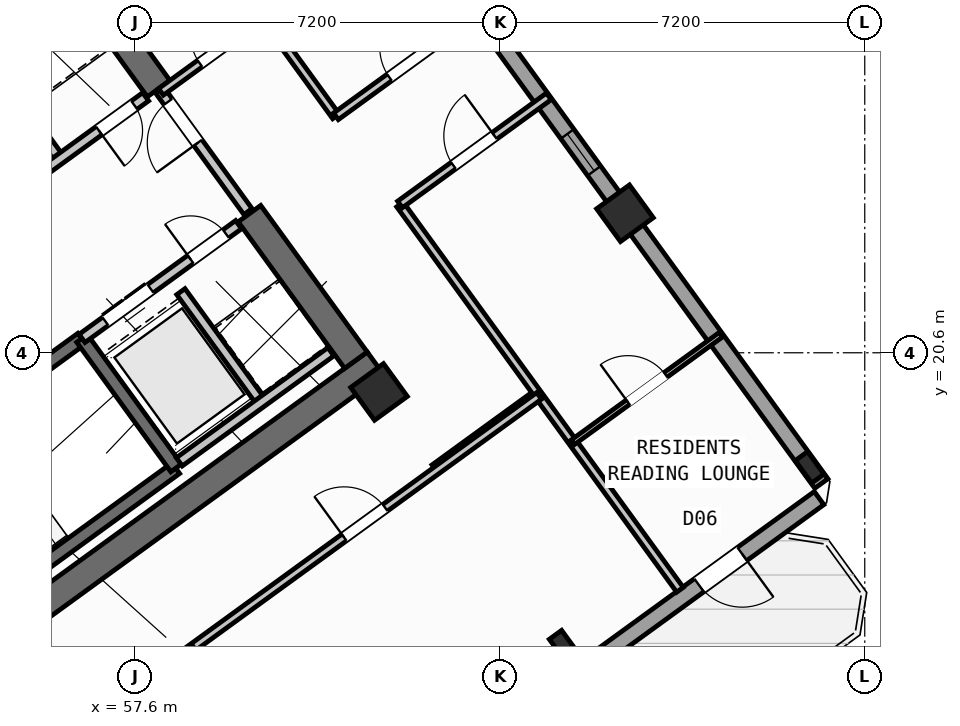
"""IFC4 building model, lengths in metres.
Left out: names, types, materials, properties, quantities, classifications, styles, units other than length and angle.
Written with IfcOpenShell. Run it as: python <this file> out.ifc"""

import sys

from ifc_helpers import new_model, si_unit, direction, frame, frame_2d, origin, origin_2d, place, context, subcontext, project, spatial, rectangle, hollow_rectangle, i_section, extrude, source, transform, mapped, element, fill, save


model = new_model("IFC4")
c1 = context("Model", 3, precision=1e-05, world=origin(), true_north=direction((0.0, 1.0)))
c2 = subcontext(c1, "Body", "Model", "MODEL_VIEW")
j1 = project(units=[si_unit("LENGTHUNIT", "METRE"), si_unit("PLANEANGLEUNIT", "RADIAN")], contexts=[c1])
p1 = place(None, origin())
s1 = spatial("IfcSite", under=j1, at=p1, CompositionType="ELEMENT")
p2 = place(p1, origin())
s2 = spatial("IfcBuilding", under=s1, at=p2, CompositionType="ELEMENT")
p3 = place(p2, frame((0.0, 0.0, 174.9)))
s3 = spatial("IfcBuildingStorey", under=s2, at=p3, CompositionType="ELEMENT", Elevation=174.9)
p4 = place(p3, frame((52.359, 13.14, 0.0), z_axis=(0.0, 0.0, 1.0), x_axis=(0.809014896919, 0.587788139183, 0.0)))
e1 = element("IfcWall", 1, at=p4, inside=s3, PredefinedType="SHEAR", context=c2, shape_type="SweptSolid", body=[
    extrude(rectangle(XDim=12.34, YDim=0.55, at=frame_2d((6.17, 0.0))), origin(), (0.0, 0.0, 1.0), 4.22),
])
p5 = place(p3, frame((61.958, 20.454, 0.0), z_axis=(0.0, 0.0, 1.0), x_axis=(-0.587802113096, 0.809004744015, 0.0)))
e2 = element("IfcWall", 2, at=p5, inside=s3, PredefinedType="SHEAR", context=c2, shape_type="SweptSolid", body=[
    extrude(rectangle(XDim=3.575, YDim=0.55, at=frame_2d((1.788, 0.0))), origin(), (0.0, 0.0, 1.0), 4.22),
])
p6 = place(p3, frame((58.064, 25.813, 0.0), z_axis=(0.0, 0.0, 1.0), x_axis=(-0.587764933797, 0.809031756236, 0.0)))
e3 = element("IfcWall", 3, at=p6, inside=s3, PredefinedType="SHEAR", context=c2, shape_type="SweptSolid", body=[
    extrude(rectangle(XDim=6.425, YDim=0.55, at=frame_2d((3.212, 0.0))), origin(), (0.0, 0.0, 1.0), 4.22),
])
m1 = source(origin(), c2, "Body", "SweptSolid", [
    extrude(i_section(OverallWidth=0.3, OverallDepth=0.55, WebThickness=0.015, FlangeThickness=0.029, at=origin_2d()), origin(), (0.0, 0.0, 1.0), 4.5),
])
p7 = place(p3, frame((66.058, 14.811, 0.0), z_axis=(0.0, 0.0, 1.0), x_axis=(0.809016994375, 0.587785252292, 0.0)))
e4 = element("IfcColumn", 4, at=p7, inside=s3, PredefinedType="COLUMN", context=c2, shape_type="MappedRepresentation", body=[
    mapped(m1, transform((0.0, 0.0, 0.0), scale=1.0)),
])
m2 = source(origin(), c2, "Body", "SweptSolid", [
    extrude(hollow_rectangle(XDim=0.8, YDim=0.8, WallThickness=0.032, at=origin_2d()), origin(), (0.0, 0.0, 1.0), 4.5),
])
p8 = place(p3, frame((62.414, 19.827, 0.0), z_axis=(0.0, 0.0, 1.0), x_axis=(0.809016994375, 0.587785252292, 0.0)))
e5 = element("IfcColumn", 5, at=p8, inside=s3, PredefinedType="COLUMN", context=c2, shape_type="MappedRepresentation", body=[
    mapped(m2, transform((0.0, 0.0, 0.0), scale=1.0)),
])
p9 = place(p3, frame((70.912, 18.338, 0.0), z_axis=(0.0, 0.0, 1.0), x_axis=(0.809016994375, 0.587785252292, 0.0)))
e6 = element("IfcColumn", 6, at=p9, inside=s3, PredefinedType="COLUMN", context=c2, shape_type="MappedRepresentation", body=[
    mapped(m1, transform((0.0, 0.0, 0.0), scale=1.0)),
])
p10 = place(p3, frame((67.268, 23.354, 0.0), z_axis=(0.0, 0.0, 1.0), x_axis=(0.809016994375, 0.587785252292, 0.0)))
e7 = element("IfcColumn", 7, at=p10, inside=s3, PredefinedType="COLUMN", context=c2, shape_type="MappedRepresentation", body=[
    mapped(m2, transform((0.0, 0.0, 0.0), scale=1.0)),
])
p11 = place(p3, frame((43.938, 25.192, 0.0), z_axis=(0.0, 0.0, 1.0), x_axis=(0.809016324578, 0.587786174187, 0.0)))
e8 = element("IfcWall", 8, at=p11, inside=s3, PredefinedType="STANDARD", context=c2, shape_type="SweptSolid", body=[
    extrude(rectangle(XDim=17.587, YDim=0.32, at=frame_2d((8.794, 0.0))), origin(), (0.0, 0.0, 1.0), 4.22),
])
p12 = place(p11, frame((14.926, 0.0, 0.0)))
e9 = element("IfcOpeningElement", 9, at=p12, cuts=e8, PredefinedType="OPENING", context=c2, shape_type="SweptSolid", body=[
    extrude(rectangle(XDim=1.05, YDim=2.15, at=frame_2d((0.525, 1.075))), frame((0.0, 0.17, 0.0), z_axis=(0.0, -1.0, 0.0), x_axis=(1.0, 0.0, 0.0)), (0.0, 0.0, 1.0), 0.34),
])
p13 = place(p11, frame((2.606, 0.0, 0.8)))
e10 = element("IfcOpeningElement", 10, at=p13, cuts=e8, PredefinedType="OPENING", context=c2, shape_type="SweptSolid", body=[
    extrude(rectangle(XDim=2.1, YDim=1.55, at=frame_2d((1.05, 0.775))), frame((0.0, 0.17, 0.0), z_axis=(0.0, -1.0, 0.0), x_axis=(1.0, 0.0, 0.0)), (0.0, 0.0, 1.0), 0.34),
])
p14 = place(p11, frame((6.881, 0.0, 0.8)))
e11 = element("IfcOpeningElement", 11, at=p14, cuts=e8, PredefinedType="OPENING", context=c2, shape_type="SweptSolid", body=[
    extrude(rectangle(XDim=2.1, YDim=1.55, at=frame_2d((1.05, 0.775))), frame((0.0, 0.17, 0.0), z_axis=(0.0, -1.0, 0.0), x_axis=(1.0, 0.0, 0.0)), (0.0, 0.0, 1.0), 0.34),
])
p15 = place(p3, frame((58.455, 35.484, 0.0), z_axis=(0.0, 0.0, 1.0), x_axis=(0.587783625747, -0.809018176127, 0.0)))
e12 = element("IfcWall", 12, at=p15, inside=s3, PredefinedType="STANDARD", context=c2, shape_type="SweptSolid", body=[
    extrude(rectangle(XDim=21.587, YDim=0.32, at=frame_2d((10.794, 0.0))), origin(), (0.0, 0.0, 1.0), 2.395),
])
p16 = place(p15, frame((1.807, 0.0, 1.0)))
e13 = element("IfcOpeningElement", 13, at=p16, cuts=e12, PredefinedType="OPENING", context=c2, shape_type="SweptSolid", body=[
    extrude(rectangle(XDim=0.9, YDim=1.25, at=frame_2d((0.45, 0.625))), frame((0.0, 0.17, 0.0), z_axis=(0.0, -1.0, 0.0), x_axis=(1.0, 0.0, 0.0)), (0.0, 0.0, 1.0), 0.34),
])
p17 = place(p15, frame((5.195, 0.0, 1.0)))
e14 = element("IfcOpeningElement", 14, at=p17, cuts=e12, PredefinedType="OPENING", context=c2, shape_type="SweptSolid", body=[
    extrude(rectangle(XDim=0.9, YDim=1.25, at=frame_2d((0.45, 0.625))), frame((0.0, 0.17, 0.0), z_axis=(0.0, -1.0, 0.0), x_axis=(1.0, 0.0, 0.0)), (0.0, 0.0, 1.0), 0.34),
])
p18 = place(p15, frame((13.059, 0.0, 1.0)))
e15 = element("IfcOpeningElement", 15, at=p18, cuts=e12, PredefinedType="OPENING", context=c2, shape_type="SweptSolid", body=[
    extrude(rectangle(XDim=0.9, YDim=1.25, at=frame_2d((0.45, 0.625))), frame((0.0, 0.17, 0.0), z_axis=(0.0, -1.0, 0.0), x_axis=(1.0, 0.0, 0.0)), (0.0, 0.0, 1.0), 0.34),
])
p19 = place(p3, frame((71.098, 17.731, 0.0), z_axis=(0.0, 0.0, 1.0), x_axis=(-0.809021120468, -0.587779573171, 0.0)))
e16 = element("IfcWall", 16, at=p19, inside=s3, PredefinedType="STANDARD", context=c2, shape_type="SweptSolid", body=[
    extrude(rectangle(XDim=17.588, YDim=0.32, at=frame_2d((8.794, 0.0))), origin(), (0.0, 0.0, 1.0), 4.22),
])
p20 = place(p19, frame((1.875, 0.0, 0.0)))
e17 = element("IfcOpeningElement", 17, at=p20, cuts=e16, PredefinedType="OPENING", context=c2, shape_type="SweptSolid", body=[
    extrude(rectangle(XDim=1.05, YDim=2.15, at=frame_2d((0.525, 1.075))), frame((0.0, 0.17, 0.0), z_axis=(0.0, -1.0, 0.0), x_axis=(1.0, 0.0, 0.0)), (0.0, 0.0, 1.0), 0.34),
])
p21 = place(p19, frame((7.801, 0.0, 0.8)))
e18 = element("IfcOpeningElement", 18, at=p21, cuts=e16, PredefinedType="OPENING", context=c2, shape_type="SweptSolid", body=[
    extrude(rectangle(XDim=2.1, YDim=1.55, at=frame_2d((1.05, 0.775))), frame((0.0, 0.17, 0.0), z_axis=(0.0, -1.0, 0.0), x_axis=(1.0, 0.0, 0.0)), (0.0, 0.0, 1.0), 0.34),
])
p22 = place(p19, frame((13.379, 0.0, 0.85)))
e19 = element("IfcOpeningElement", 19, at=p22, cuts=e16, PredefinedType="OPENING", context=c2, shape_type="SweptSolid", body=[
    extrude(rectangle(XDim=1.8, YDim=1.5, at=frame_2d((0.9, 0.75))), frame((0.0, 0.17, 0.0), z_axis=(0.0, -1.0, 0.0), x_axis=(1.0, 0.0, 0.0)), (0.0, 0.0, 1.0), 0.34),
])
p23 = place(p3, frame((49.863, 23.44, 0.0), z_axis=(0.0, 0.0, 1.0), x_axis=(0.809003474932, 0.587803859759, 0.0)))
e20 = element("IfcWall", 20, at=p23, inside=s3, PredefinedType="SHEAR", context=c2, shape_type="SweptSolid", body=[
    extrude(rectangle(XDim=7.46, YDim=0.26, at=frame_2d((3.73, 0.0))), origin(), (0.0, 0.0, 1.0), 4.22),
])
p24 = place(p23, frame((0.36, 0.0, 0.0)))
e21 = element("IfcOpeningElement", 21, at=p24, cuts=e20, PredefinedType="OPENING", context=c2, shape_type="SweptSolid", body=[
    extrude(rectangle(XDim=0.86, YDim=2.05, at=frame_2d((0.43, 1.025))), frame((0.0, 0.14, 0.0), z_axis=(0.0, -1.0, 0.0), x_axis=(1.0, 0.0, 0.0)), (0.0, 0.0, 1.0), 0.28),
])
p25 = place(p3, frame((52.472, 14.013, 0.0), z_axis=(0.0, 0.0, 1.0), x_axis=(0.809028366311, 0.587769599847, 0.0)))
e22 = element("IfcWall", 22, at=p25, inside=s3, PredefinedType="SHEAR", context=c2, shape_type="SweptSolid", body=[
    extrude(rectangle(XDim=7.33, YDim=0.26, at=frame_2d((3.665, 0.0))), origin(), (0.0, 0.0, 1.0), 4.22),
])
p26 = place(p3, frame((50.615, 16.57, 0.0), z_axis=(0.0, 0.0, 1.0), x_axis=(0.809028366311, 0.587769599847, 0.0)))
e23 = element("IfcWall", 23, at=p26, inside=s3, PredefinedType="SHEAR", context=c2, shape_type="SweptSolid", body=[
    extrude(rectangle(XDim=7.33, YDim=0.26, at=frame_2d((3.665, 0.0))), origin(), (0.0, 0.0, 1.0), 4.22),
])
p27 = place(p26, frame((0.22, 0.0, 0.0)))
e24 = element("IfcOpeningElement", 24, at=p27, cuts=e23, PredefinedType="OPENING", context=c2, shape_type="SweptSolid", body=[
    extrude(rectangle(XDim=1.1, YDim=2.1, at=frame_2d((0.55, 1.05))), frame((0.0, 0.14, 0.0), z_axis=(0.0, -1.0, 0.0), x_axis=(1.0, 0.0, 0.0)), (0.0, 0.0, 1.0), 0.28),
])
p28 = place(p3, frame((58.41, 18.327, 0.0), z_axis=(0.0, 0.0, 1.0), x_axis=(-0.58776738483, 0.809029975545, 0.0)))
e25 = element("IfcWall", 25, at=p28, inside=s3, PredefinedType="SHEAR", context=c2, shape_type="SweptSolid", body=[
    extrude(rectangle(XDim=3.16, YDim=0.26, at=frame_2d((1.58, 0.0))), origin(), (0.0, 0.0, 1.0), 4.22),
])
p29 = place(p3, frame((56.553, 20.884, 0.0), z_axis=(0.0, 0.0, 1.0), x_axis=(0.809023564264, 0.58777620951, 0.0)))
e26 = element("IfcWall", 26, at=p29, inside=s3, PredefinedType="STANDARD", context=c2, shape_type="SweptSolid", body=[
    extrude(rectangle(XDim=3.818, YDim=0.2, at=frame_2d((1.909, 0.0))), origin(), (0.0, 0.0, 1.0), 4.21),
])
p30 = place(p29, frame((0.57, 0.0, 0.0)))
e27 = element("IfcOpeningElement", 27, at=p30, cuts=e26, PredefinedType="OPENING", context=c2, shape_type="SweptSolid", body=[
    extrude(rectangle(XDim=1.1, YDim=2.15, at=frame_2d((0.55, 1.075))), frame((0.0, 0.11, 0.0), z_axis=(0.0, -1.0, 0.0), x_axis=(1.0, 0.0, 0.0)), (0.0, 0.0, 1.0), 0.22),
])
p31 = place(p29, frame((2.65, 0.0, 0.0)))
e28 = element("IfcOpeningElement", 28, at=p31, cuts=e26, PredefinedType="OPENING", context=c2, shape_type="SweptSolid", body=[
    extrude(rectangle(XDim=0.86, YDim=2.05, at=frame_2d((0.43, 1.025))), frame((0.0, 0.11, 0.0), z_axis=(0.0, -1.0, 0.0), x_axis=(1.0, 0.0, 0.0)), (0.0, 0.0, 1.0), 0.22),
])
p32 = place(p3, frame((60.067, 19.655, 0.0), z_axis=(0.0, 0.0, 1.0), x_axis=(-0.587800520745, 0.809005900975, 0.0)))
e29 = element("IfcWall", 29, at=p32, inside=s3, PredefinedType="STANDARD", context=c2, shape_type="SweptSolid", body=[
    extrude(rectangle(XDim=2.66, YDim=0.2, at=frame_2d((1.33, 0.0))), origin(), (0.0, 0.0, 1.0), 4.21),
])
p33 = place(p3, frame((58.472, 18.447, 0.0), z_axis=(0.0, 0.0, 1.0), x_axis=(0.809018631237, 0.587782999339, 0.0)))
e30 = element("IfcWall", 30, at=p33, inside=s3, PredefinedType="STANDARD", context=c2, shape_type="SweptSolid", body=[
    extrude(rectangle(XDim=3.698, YDim=0.2, at=frame_2d((1.849, 0.0))), origin(), (0.0, 0.0, 1.0), 4.21),
])
p34 = place(p3, frame((56.111, 24.419, 0.0), z_axis=(0.0, 0.0, 1.0), x_axis=(-0.58777848983, 0.809021907548, 0.0)))
e31 = element("IfcWall", 31, at=p34, inside=s3, PredefinedType="STANDARD", context=c2, shape_type="SweptSolid", body=[
    extrude(rectangle(XDim=2.88, YDim=0.2, at=frame_2d((1.44, 0.0))), origin(), (0.0, 0.0, 1.0), 4.21),
])
p35 = place(p3, frame((53.425, 22.468, 0.0), z_axis=(0.0, 0.0, 1.0), x_axis=(0.809024377198, 0.587775090574, 0.0)))
e32 = element("IfcWall", 32, at=p35, inside=s3, PredefinedType="STANDARD", context=c2, shape_type="SweptSolid", body=[
    extrude(rectangle(XDim=5.418, YDim=0.2, at=frame_2d((2.709, 0.0))), origin(), (0.0, 0.0, 1.0), 4.21),
])
p36 = place(p35, frame((4.28, 0.0, 0.0)))
e33 = element("IfcOpeningElement", 33, at=p36, cuts=e32, PredefinedType="OPENING", context=c2, shape_type="SweptSolid", body=[
    extrude(rectangle(XDim=0.86, YDim=2.05, at=frame_2d((0.43, 1.025))), frame((0.0, 0.11, 0.0), z_axis=(0.0, -1.0, 0.0), x_axis=(1.0, 0.0, 0.0)), (0.0, 0.0, 1.0), 0.22),
])
p37 = place(p35, frame((0.35, 0.0, 0.0)))
e34 = element("IfcOpeningElement", 34, at=p37, cuts=e32, PredefinedType="OPENING", context=c2, shape_type="SweptSolid", body=[
    extrude(rectangle(XDim=0.86, YDim=2.05, at=frame_2d((0.43, 1.025))), frame((0.0, 0.11, 0.0), z_axis=(0.0, -1.0, 0.0), x_axis=(1.0, 0.0, 0.0)), (0.0, 0.0, 1.0), 0.22),
])
p38 = place(p3, frame((59.827, 23.386, 0.0), z_axis=(0.0, 0.0, 1.0), x_axis=(-0.587803840107, 0.809003489211, 0.0)))
e35 = element("IfcWall", 35, at=p38, inside=s3, PredefinedType="STANDARD", context=c2, shape_type="SweptSolid", body=[
    extrude(rectangle(XDim=2.96, YDim=0.2, at=frame_2d((1.48, 0.0))), origin(), (0.0, 0.0, 1.0), 2.395),
])
p39 = place(p38, frame((1.68, 0.0, 0.0)))
e36 = element("IfcOpeningElement", 36, at=p39, cuts=e35, PredefinedType="OPENING", context=c2, shape_type="SweptSolid", body=[
    extrude(rectangle(XDim=1.0, YDim=2.1, at=frame_2d((0.5, 1.05))), frame((0.0, 0.11, 0.0), z_axis=(0.0, -1.0, 0.0), x_axis=(1.0, 0.0, 0.0)), (0.0, 0.0, 1.0), 0.22),
])
p40 = place(p3, frame((63.507, 18.322, 0.0), z_axis=(0.0, 0.0, 1.0), x_axis=(0.809034604122, 0.587761013791, 0.0)))
e37 = element("IfcWall", 37, at=p40, inside=s3, PredefinedType="PARTITIONING", context=c2, shape_type="SweptSolid", body=[
    extrude(rectangle(XDim=2.51, YDim=0.16, at=frame_2d((1.255, 0.0))), origin(), (0.0, 0.0, 1.0), 4.21),
])
p41 = place(p3, frame((58.111, 25.749, 0.0), z_axis=(0.0, 0.0, 1.0), x_axis=(0.809000999347, 0.58780726693, 0.0)))
e38 = element("IfcWall", 38, at=p41, inside=s3, PredefinedType="PARTITIONING", context=c2, shape_type="SweptSolid", body=[
    extrude(rectangle(XDim=2.51, YDim=0.16, at=frame_2d((1.255, 0.0))), origin(), (0.0, 0.0, 1.0), 3.695),
])
p42 = place(p41, frame((0.95, 0.0, 0.0)))
e39 = element("IfcOpeningElement", 39, at=p42, cuts=e38, PredefinedType="OPENING", context=c2, shape_type="SweptSolid", body=[
    extrude(rectangle(XDim=1.0, YDim=2.1, at=frame_2d((0.5, 1.05))), frame((0.0, 0.09, 0.0), z_axis=(0.0, -1.0, 0.0), x_axis=(1.0, 0.0, 0.0)), (0.0, 0.0, 1.0), 0.18),
])
p43 = place(p3, frame((68.353, 15.922, 0.0), z_axis=(0.0, 0.0, 1.0), x_axis=(-0.587784007866, 0.809017898502, 0.0)))
e40 = element("IfcWall", 40, at=p43, inside=s3, PredefinedType="PARTITIONING", context=c2, shape_type="SweptSolid", body=[
    extrude(rectangle(XDim=9.4, YDim=0.16, at=frame_2d((4.7, 0.0))), origin(), (0.0, 0.0, 1.0), 4.21),
])
p44 = place(p3, frame((61.564, 25.266, 0.0), z_axis=(0.0, 0.0, 1.0), x_axis=(-0.587792629712, 0.809011634314, 0.0)))
e41 = element("IfcWall", 41, at=p44, inside=s3, PredefinedType="PARTITIONING", context=c2, shape_type="SweptSolid", body=[
    extrude(rectangle(XDim=10.15, YDim=0.16, at=frame_2d((5.075, 0.0))), origin(), (0.0, 0.0, 1.0), 4.21),
])
p45 = place(p3, frame((62.828, 23.527, 0.0), z_axis=(0.0, 0.0, 1.0), x_axis=(0.809003564202, 0.587803736896, 0.0)))
e42 = element("IfcWall", 42, at=p45, inside=s3, PredefinedType="PARTITIONING", context=c2, shape_type="SweptSolid", body=[
    extrude(rectangle(XDim=3.63, YDim=0.16, at=frame_2d((1.815, 0.0))), origin(), (0.0, 0.0, 1.0), 4.21),
])
p46 = place(p45, frame((1.305, 0.0, 0.0)))
e43 = element("IfcOpeningElement", 43, at=p46, cuts=e42, PredefinedType="OPENING", context=c2, shape_type="SweptSolid", body=[
    extrude(rectangle(XDim=1.0, YDim=2.1, at=frame_2d((0.5, 1.05))), frame((0.0, 0.09, 0.0), z_axis=(0.0, -1.0, 0.0), x_axis=(1.0, 0.0, 0.0)), (0.0, 0.0, 1.0), 0.18),
])
p47 = place(p3, frame((61.564, 25.266, 0.0), z_axis=(0.0, 0.0, 1.0), x_axis=(0.809012309495, 0.587791700422, 0.0)))
e44 = element("IfcWall", 44, at=p47, inside=s3, PredefinedType="PARTITIONING", context=c2, shape_type="SweptSolid", body=[
    extrude(rectangle(XDim=3.63, YDim=0.16, at=frame_2d((1.815, 0.0))), origin(), (0.0, 0.0, 1.0), 4.21),
])
p48 = place(p47, frame((1.305, 0.0, 0.0)))
e45 = element("IfcOpeningElement", 45, at=p48, cuts=e44, PredefinedType="OPENING", context=c2, shape_type="SweptSolid", body=[
    extrude(rectangle(XDim=1.0, YDim=2.1, at=frame_2d((0.5, 1.05))), frame((0.0, 0.09, 0.0), z_axis=(0.0, -1.0, 0.0), x_axis=(1.0, 0.0, 0.0)), (0.0, 0.0, 1.0), 0.18),
])
p49 = place(p3, frame((66.238, 18.833, 0.0), z_axis=(0.0, 0.0, 1.0), x_axis=(0.809013833588, 0.587789602718, 0.0)))
e46 = element("IfcWall", 46, at=p49, inside=s3, PredefinedType="PARTITIONING", context=c2, shape_type="SweptSolid", body=[
    extrude(rectangle(XDim=3.61, YDim=0.11, at=frame_2d((1.805, 0.0))), origin(), (0.0, 0.0, 1.0), 4.21),
])
p50 = place(p49, frame((1.345, 0.0, 0.0)))
e47 = element("IfcOpeningElement", 47, at=p50, cuts=e46, PredefinedType="OPENING", context=c2, shape_type="SweptSolid", body=[
    extrude(rectangle(XDim=0.92, YDim=2.08, at=frame_2d((0.46, 1.04))), frame((0.0, 0.065, 0.0), z_axis=(0.0, -1.0, 0.0), x_axis=(1.0, 0.0, 0.0)), (0.0, 0.0, 1.0), 0.13),
])
p51 = place(p3, frame((53.705, 11.126, 0.0), z_axis=(0.0, 0.0, 1.0), x_axis=(0.809014504436, 0.587788679384, 0.0)))
e48 = element("IfcWall", 48, at=p51, inside=s3, PredefinedType="PARTITIONING", context=c2, shape_type="SweptSolid", body=[
    extrude(rectangle(XDim=14.67, YDim=0.16, at=frame_2d((7.335, 0.0))), origin(), (0.0, 0.0, 1.0), 4.21),
])
p52 = place(p51, frame((3.215, 0.0, 0.0)))
e49 = element("IfcOpeningElement", 49, at=p52, cuts=e48, PredefinedType="OPENING", context=c2, shape_type="SweptSolid", body=[
    extrude(rectangle(XDim=1.0, YDim=2.1, at=frame_2d((0.5, 1.05))), frame((0.0, 0.09, 0.0), z_axis=(0.0, -1.0, 0.0), x_axis=(1.0, 0.0, 0.0)), (0.0, 0.0, 1.0), 0.18),
])
p53 = place(p51, frame((9.915, 0.0, 0.0)))
e50 = element("IfcOpeningElement", 50, at=p53, cuts=e48, PredefinedType="OPENING", context=c2, shape_type="SweptSolid", body=[
    extrude(rectangle(XDim=1.0, YDim=2.1, at=frame_2d((0.5, 1.05))), frame((0.0, 0.09, 0.0), z_axis=(0.0, -1.0, 0.0), x_axis=(1.0, 0.0, 0.0)), (0.0, 0.0, 1.0), 0.18),
])
m3 = source(origin(), c2, "Body", "SweptSolid", [
    extrude(rectangle(XDim=1.05, YDim=2.15, at=frame_2d((0.525, 1.075))), frame((0.0, 0.025, 0.0), z_axis=(0.0, -1.0, 0.0), x_axis=(1.0, 0.0, 0.0)), (0.0, 0.0, 1.0), 0.05),
])
p54 = place(p20, origin())
e51 = element("IfcDoor", 51, at=p54, inside=s3, OperationType="SINGLE_SWING_LEFT", PredefinedType="DOOR", context=c2, shape_type="MappedRepresentation", body=[
    mapped(m3, transform((0.0, 0.0, 0.0), scale=1.0)),
])
fill(e17, e51)
m4 = source(origin(), c2, "Body", "SweptSolid", [
    extrude(rectangle(XDim=0.9, YDim=1.25, at=frame_2d((0.45, 0.625))), frame((0.0, 0.03, 0.0), z_axis=(0.0, -1.0, 0.0), x_axis=(1.0, 0.0, 0.0)), (0.0, 0.0, 1.0), 0.06),
])
p55 = place(p18, origin())
e52 = element("IfcWindow", 52, at=p55, inside=s3, PartitioningType="SINGLE_PANEL", PredefinedType="WINDOW", context=c2, shape_type="MappedRepresentation", body=[
    mapped(m4, transform((0.0, 0.0, 0.0), scale=1.0)),
])
fill(e15, e52)
m5 = source(origin(), c2, "Body", "SweptSolid", [
    extrude(rectangle(XDim=1.1, YDim=2.15, at=frame_2d((0.55, 1.075))), frame((0.0, 0.025, 0.0), z_axis=(0.0, -1.0, 0.0), x_axis=(1.0, 0.0, 0.0)), (0.0, 0.0, 1.0), 0.05),
])
p56 = place(p30, origin())
e53 = element("IfcDoor", 53, at=p56, inside=s3, OperationType="DOUBLE_DOOR_SLIDING", PredefinedType="DOOR", context=c2, shape_type="MappedRepresentation", body=[
    mapped(m5, transform((0.0, 0.0, 0.0), scale=1.0)),
])
fill(e27, e53)
m6 = source(origin(), c2, "Body", "SweptSolid", [
    extrude(rectangle(XDim=0.86, YDim=2.05, at=frame_2d((0.43, 1.025))), frame((0.0, 0.025, 0.0), z_axis=(0.0, -1.0, 0.0), x_axis=(1.0, 0.0, 0.0)), (0.0, 0.0, 1.0), 0.05),
])
p57 = place(p31, origin())
e54 = element("IfcDoor", 54, at=p57, inside=s3, OperationType="SINGLE_SWING_LEFT", PredefinedType="DOOR", context=c2, shape_type="MappedRepresentation", body=[
    mapped(m6, transform((0.0, 0.0, 0.0), scale=1.0)),
])
fill(e28, e54)
p58 = place(p36, frame((0.86, 0.0, 0.0), z_axis=(0.0, 0.0, 1.0), x_axis=(-1.0, 0.0, 0.0)))
e55 = element("IfcDoor", 55, at=p58, inside=s3, OperationType="SINGLE_SWING_RIGHT", PredefinedType="DOOR", context=c2, shape_type="MappedRepresentation", body=[
    mapped(m6, transform((0.0, 0.0, 0.0), scale=1.0)),
])
fill(e33, e55)
m7 = source(origin(), c2, "Body", "SweptSolid", [
    extrude(rectangle(XDim=1.0, YDim=2.1, at=frame_2d((0.5, 1.05))), frame((0.0, 0.025, 0.0), z_axis=(0.0, -1.0, 0.0), x_axis=(1.0, 0.0, 0.0)), (0.0, 0.0, 1.0), 0.05),
])
p59 = place(p42, origin())
e56 = element("IfcDoor", 56, at=p59, inside=s3, OperationType="SINGLE_SWING_RIGHT", PredefinedType="DOOR", context=c2, shape_type="MappedRepresentation", body=[
    mapped(m7, transform((0.0, 0.0, 0.0), scale=1.0)),
])
fill(e39, e56)
p60 = place(p39, origin())
e57 = element("IfcDoor", 57, at=p60, inside=s3, OperationType="SINGLE_SWING_LEFT", PredefinedType="DOOR", context=c2, shape_type="MappedRepresentation", body=[
    mapped(m7, transform((0.0, 0.0, 0.0), scale=1.0)),
])
fill(e36, e57)
p61 = place(p48, origin())
e58 = element("IfcDoor", 58, at=p61, inside=s3, OperationType="SINGLE_SWING_RIGHT", PredefinedType="DOOR", context=c2, shape_type="MappedRepresentation", body=[
    mapped(m7, transform((0.0, 0.0, 0.0), scale=1.0)),
])
fill(e45, e58)
p62 = place(p46, origin())
e59 = element("IfcDoor", 59, at=p62, inside=s3, OperationType="SINGLE_SWING_RIGHT", PredefinedType="DOOR", context=c2, shape_type="MappedRepresentation", body=[
    mapped(m7, transform((0.0, 0.0, 0.0), scale=1.0)),
])
fill(e43, e59)
m8 = source(origin(), c2, "Body", "SweptSolid", [
    extrude(rectangle(XDim=0.92, YDim=2.08, at=frame_2d((0.46, 1.04))), frame((0.0, 0.025, 0.0), z_axis=(0.0, -1.0, 0.0), x_axis=(1.0, 0.0, 0.0)), (0.0, 0.0, 1.0), 0.05),
])
p63 = place(p50, origin())
e60 = element("IfcDoor", 60, at=p63, inside=s3, OperationType="SINGLE_SWING_LEFT", PredefinedType="DOOR", context=c2, shape_type="MappedRepresentation", body=[
    mapped(m8, transform((0.0, 0.0, 0.0), scale=1.0)),
])
fill(e47, e60)
p64 = place(p53, origin())
e61 = element("IfcDoor", 61, at=p64, inside=s3, OperationType="SINGLE_SWING_LEFT", PredefinedType="DOOR", context=c2, shape_type="MappedRepresentation", body=[
    mapped(m7, transform((0.0, 0.0, 0.0), scale=1.0)),
])
fill(e50, e61)
save(model, sys.argv[1])
